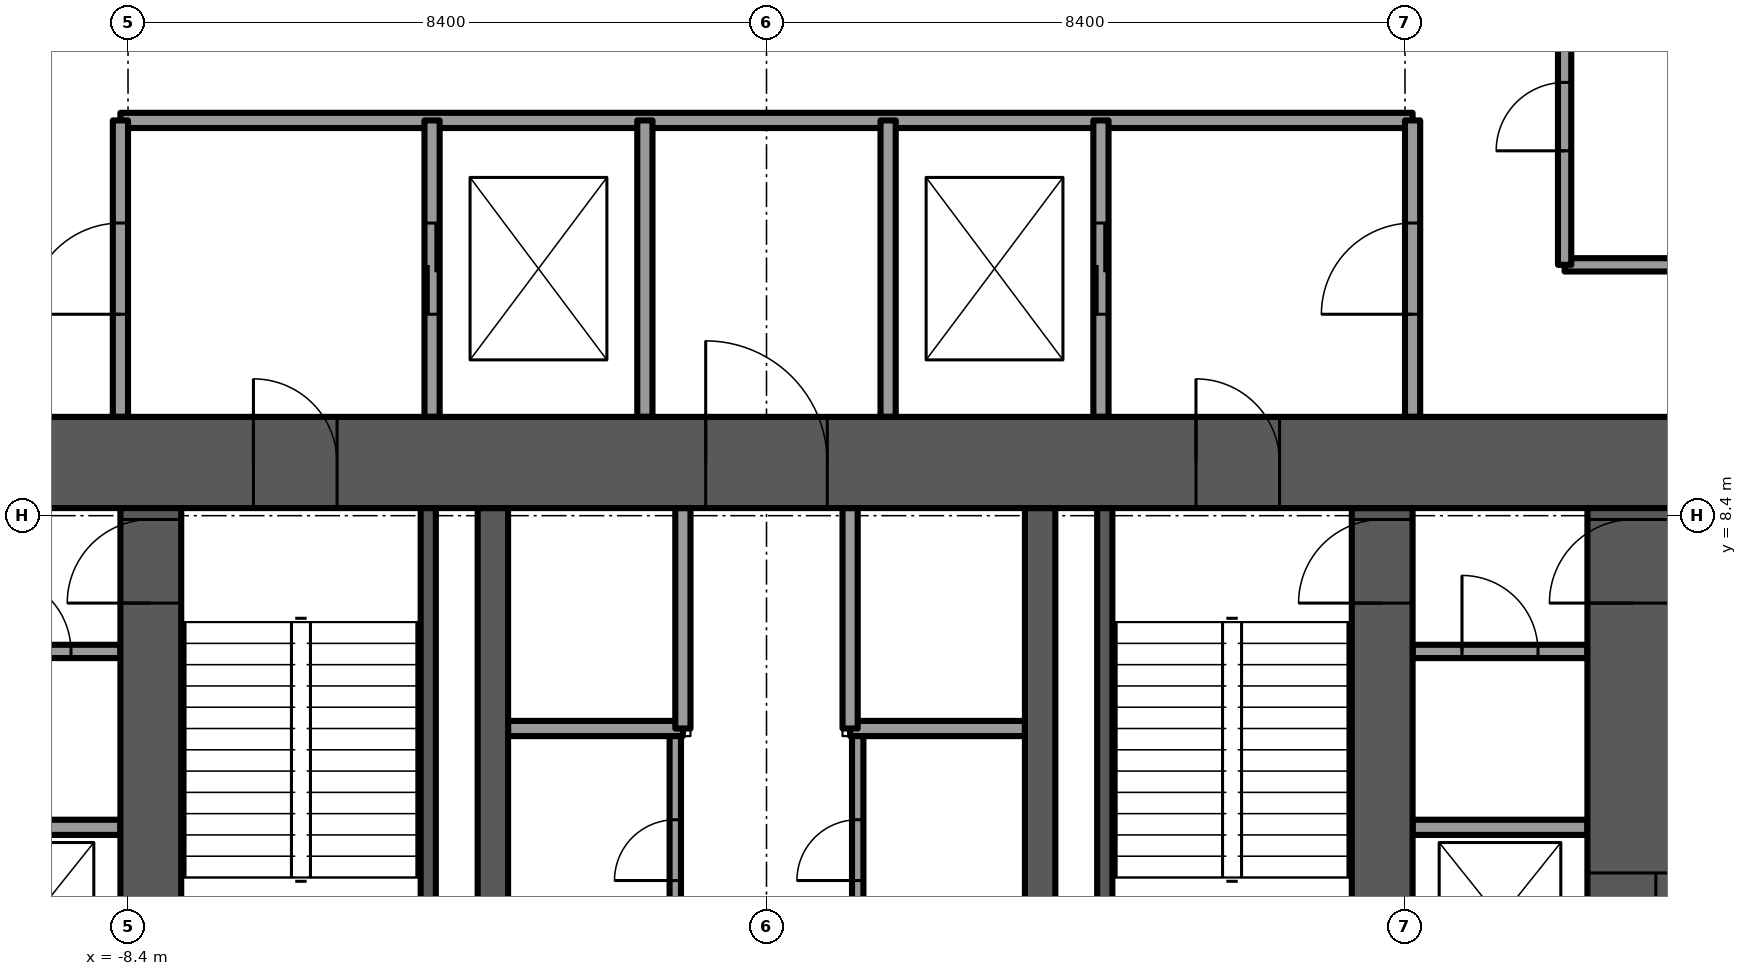
"""IFC4 building model, lengths in metres.
Left out: names, types, materials, properties, quantities, classifications, styles, units other than length and angle.
Written with IfcOpenShell. Run it as: python <this file> out.ifc"""

import sys

from ifc_helpers import new_model, si_unit, direction, frame, frame_2d, origin, place, context, subcontext, project, spatial, rectangle, extrude, element, fill, save


model = new_model("IFC4")
c1 = context("Model", 3, precision=1e-05, world=origin(), true_north=direction((0.0, 1.0)))
c2 = subcontext(c1, "Body", "Model", "MODEL_VIEW")
j1 = project(units=[si_unit("LENGTHUNIT", "METRE"), si_unit("PLANEANGLEUNIT", "RADIAN")], contexts=[c1])
p1 = place(None, origin())
s1 = spatial("IfcSite", under=j1, at=p1, CompositionType="ELEMENT")
p2 = place(p1, origin())
s2 = spatial("IfcBuilding", under=s1, at=p2, CompositionType="ELEMENT")
p3 = place(p2, frame((0.0, 0.0, 14.5)))
s3 = spatial("IfcBuildingStorey", under=s2, at=p3, CompositionType="ELEMENT", Elevation=14.5)
p4 = place(p3, frame((-12.0, 9.1, -0.3), z_axis=(0.0, 0.0, 1.0), x_axis=(1.0, 0.0, 0.0)))
e1 = element("IfcWall", 1, at=p4, inside=s3, PredefinedType="SHEAR", context=c2, shape_type="SweptSolid", body=[
    extrude(rectangle(XDim=24.0, YDim=1.2, at=frame_2d((12.0, 0.0))), origin(), (0.0, 0.0, 1.0), 4.5),
])
p5 = place(p4, frame((11.2, 0.0, 0.0)))
e2 = element("IfcOpeningElement", 2, at=p5, cuts=e1, PredefinedType="OPENING", context=c2, shape_type="SweptSolid", body=[
    extrude(rectangle(XDim=1.6, YDim=2.1, at=frame_2d((0.8, 1.05))), frame((0.0, 0.6, 0.0), z_axis=(0.0, -1.0, 0.0), x_axis=(1.0, 0.0, 0.0)), (0.0, 0.0, 1.0), 1.2),
])
p6 = place(p4, frame((5.25, 0.0, 0.0)))
e3 = element("IfcOpeningElement", 3, at=p6, cuts=e1, PredefinedType="OPENING", context=c2, shape_type="SweptSolid", body=[
    extrude(rectangle(XDim=1.1, YDim=2.1, at=frame_2d((0.55, 1.05))), frame((0.0, 0.6, 0.0), z_axis=(0.0, -1.0, 0.0), x_axis=(1.0, 0.0, 0.0)), (0.0, 0.0, 1.0), 1.2),
])
p7 = place(p4, frame((17.65, 0.0, 0.0)))
e4 = element("IfcOpeningElement", 4, at=p7, cuts=e1, PredefinedType="OPENING", context=c2, shape_type="SweptSolid", body=[
    extrude(rectangle(XDim=1.1, YDim=2.1, at=frame_2d((0.55, 1.05))), frame((0.0, 0.6, 0.0), z_axis=(0.0, -1.0, 0.0), x_axis=(1.0, 0.0, 0.0)), (0.0, 0.0, 1.0), 1.2),
])
p8 = place(p3, frame((-8.1, -0.5, -0.3), z_axis=(0.0, 0.0, 1.0), x_axis=(0.0, 1.0, 0.0)))
e5 = element("IfcWall", 5, at=p8, inside=s3, PredefinedType="SHEAR", context=c2, shape_type="SweptSolid", body=[
    extrude(rectangle(XDim=9.0, YDim=0.8, at=frame_2d((4.5, 0.0))), origin(), (0.0, 0.0, 1.0), 4.5),
])
p9 = place(p8, frame((7.75, 0.0, 0.0)))
e6 = element("IfcOpeningElement", 6, at=p9, cuts=e5, PredefinedType="OPENING", context=c2, shape_type="SweptSolid", body=[
    extrude(rectangle(XDim=1.1, YDim=2.1, at=frame_2d((0.55, 1.05))), frame((0.0, 0.4, 0.0), z_axis=(0.0, -1.0, 0.0), x_axis=(1.0, 0.0, 0.0)), (0.0, 0.0, 1.0), 0.8),
])
p10 = place(p3, frame((8.1, -0.5, -0.3), z_axis=(0.0, 0.0, 1.0), x_axis=(0.0, 1.0, 0.0)))
e7 = element("IfcWall", 7, at=p10, inside=s3, PredefinedType="SHEAR", context=c2, shape_type="SweptSolid", body=[
    extrude(rectangle(XDim=9.0, YDim=0.8, at=frame_2d((4.5, 0.0))), origin(), (0.0, 0.0, 1.0), 4.5),
])
p11 = place(p10, frame((7.75, 0.0, 0.0)))
e8 = element("IfcOpeningElement", 8, at=p11, cuts=e7, PredefinedType="OPENING", context=c2, shape_type="SweptSolid", body=[
    extrude(rectangle(XDim=1.1, YDim=2.1, at=frame_2d((0.55, 1.05))), frame((0.0, 0.4, 0.0), z_axis=(0.0, -1.0, 0.0), x_axis=(1.0, 0.0, 0.0)), (0.0, 0.0, 1.0), 0.8),
])
for number, where, z_axis, x_axis in (
    (9, (-3.6, -0.5, -0.3), (0.0, 0.0, 1.0), (0.0, 1.0, 0.0)),
    (10, (3.6, -0.5, -0.3), (0.0, 0.0, 1.0), (0.0, 1.0, 0.0)),
):
    element("IfcWall", number, at=place(p3, frame(where, z_axis=z_axis, x_axis=x_axis)), inside=s3, PredefinedType="SHEAR", context=c2, shape_type="SweptSolid", body=[
        extrude(rectangle(XDim=9.0, YDim=0.4, at=frame_2d((4.5, 0.0))), origin(), (0.0, 0.0, 1.0), 4.5),
    ])
p12 = place(p3, frame((11.4, -0.5, -0.3), z_axis=(0.0, 0.0, 1.0), x_axis=(0.0, 1.0, 0.0)))
e11 = element("IfcWall", 11, at=p12, inside=s3, PredefinedType="SHEAR", context=c2, shape_type="SweptSolid", body=[
    extrude(rectangle(XDim=9.0, YDim=1.2, at=frame_2d((4.5, 0.0))), origin(), (0.0, 0.0, 1.0), 4.5),
])
p13 = place(p12, frame((7.75, 0.0, 0.0)))
e12 = element("IfcOpeningElement", 12, at=p13, cuts=e11, PredefinedType="OPENING", context=c2, shape_type="SweptSolid", body=[
    extrude(rectangle(XDim=1.1, YDim=2.1, at=frame_2d((0.55, 1.05))), frame((0.0, 0.6, 0.0), z_axis=(0.0, -1.0, 0.0), x_axis=(1.0, 0.0, 0.0)), (0.0, 0.0, 1.0), 1.2),
])
p14 = place(p12, frame((0.55, 0.0, 0.0)))
e13 = element("IfcOpeningElement", 13, at=p14, cuts=e11, PredefinedType="OPENING", context=c2, shape_type="SweptSolid", body=[
    extrude(rectangle(XDim=1.2, YDim=2.1, at=frame_2d((0.6, 1.05))), frame((0.0, 0.6, 0.0), z_axis=(0.0, -1.0, 0.0), x_axis=(1.0, 0.0, 0.0)), (0.0, 0.0, 1.0), 1.2),
])
p15 = place(p12, frame((3.0, 0.0, 0.0)))
e14 = element("IfcOpeningElement", 14, at=p15, cuts=e11, PredefinedType="OPENING", context=c2, shape_type="SweptSolid", body=[
    extrude(rectangle(XDim=1.2, YDim=2.1, at=frame_2d((0.6, 1.05))), frame((0.0, 0.6, 0.0), z_axis=(0.0, -1.0, 0.0), x_axis=(1.0, 0.0, 0.0)), (0.0, 0.0, 1.0), 1.2),
])
for number, where, z_axis, x_axis in (
    (15, (-3.4, 5.6, 0.0), (0.0, 0.0, 1.0), (1.0, 0.0, 0.0)),
    (16, (1.1, 5.6, 0.0), (0.0, 0.0, 1.0), (1.0, 0.0, 0.0)),
):
    element("IfcWall", number, at=place(p3, frame(where, z_axis=z_axis, x_axis=x_axis)), inside=s3, PredefinedType="PARTITIONING", context=c2, shape_type="SweptSolid", body=[
        extrude(rectangle(XDim=2.3, YDim=0.2, at=frame_2d((1.15, 0.0))), origin(), (0.0, 0.0, 1.0), 4.2),
    ])
for number, where, z_axis, x_axis in (
    (17, (-1.1, 5.6, 0.0), (0.0, 0.0, 1.0), (0.0, 1.0, 0.0)),
    (18, (1.1, 5.6, 0.0), (0.0, 0.0, 1.0), (0.0, 1.0, 0.0)),
):
    element("IfcWall", number, at=place(p3, frame(where, z_axis=z_axis, x_axis=x_axis)), inside=s3, PredefinedType="PARTITIONING", context=c2, shape_type="SweptSolid", body=[
        extrude(rectangle(XDim=2.9, YDim=0.2, at=frame_2d((1.45, 0.0))), origin(), (0.0, 0.0, 1.0), 4.2),
    ])
for number, where, z_axis, x_axis in (
    (19, (-4.45, 0.9, -0.3), (0.0, 0.0, 1.0), (0.0, 1.0, 0.0)),
    (20, (4.45, 0.9, -0.3), (0.0, 0.0, 1.0), (0.0, 1.0, 0.0)),
):
    element("IfcWall", number, at=place(p3, frame(where, z_axis=z_axis, x_axis=x_axis)), inside=s3, PredefinedType="SOLIDWALL", context=c2, shape_type="SweptSolid", body=[
        extrude(rectangle(XDim=7.6, YDim=0.2, at=frame_2d((3.8, 0.0))), origin(), (0.0, 0.0, 1.0), 4.5),
    ])
p16 = place(p3, frame((-8.5, 13.6, 0.0), z_axis=(0.0, 0.0, 1.0), x_axis=(1.0, 0.0, 0.0)))
e21 = element("IfcWall", 21, at=p16, inside=s3, PredefinedType="PARTITIONING", context=c2, shape_type="SweptSolid", body=[
    extrude(rectangle(XDim=17.0, YDim=0.2, at=frame_2d((8.5, 0.0))), origin(), (0.0, 0.0, 1.0), 4.2),
])
p17 = place(p3, frame((-8.5, 9.7, 0.0), z_axis=(0.0, 0.0, 1.0), x_axis=(0.0, 1.0, 0.0)))
e22 = element("IfcWall", 22, at=p17, inside=s3, PredefinedType="PARTITIONING", context=c2, shape_type="SweptSolid", body=[
    extrude(rectangle(XDim=3.9, YDim=0.2, at=frame_2d((1.95, 0.0))), origin(), (0.0, 0.0, 1.0), 4.2),
])
p18 = place(p17, frame((1.35, 0.0, 0.0)))
e23 = element("IfcOpeningElement", 23, at=p18, cuts=e22, PredefinedType="OPENING", context=c2, shape_type="SweptSolid", body=[
    extrude(rectangle(XDim=1.2, YDim=2.1, at=frame_2d((0.6, 1.05))), frame((0.0, 0.1, 0.0), z_axis=(0.0, -1.0, 0.0), x_axis=(1.0, 0.0, 0.0)), (0.0, 0.0, 1.0), 0.2),
])
p19 = place(p3, frame((8.5, 9.7, 0.0), z_axis=(0.0, 0.0, 1.0), x_axis=(0.0, 1.0, 0.0)))
e24 = element("IfcWall", 24, at=p19, inside=s3, PredefinedType="PARTITIONING", context=c2, shape_type="SweptSolid", body=[
    extrude(rectangle(XDim=3.9, YDim=0.2, at=frame_2d((1.95, 0.0))), origin(), (0.0, 0.0, 1.0), 4.2),
])
p20 = place(p19, frame((1.35, 0.0, 0.0)))
e25 = element("IfcOpeningElement", 25, at=p20, cuts=e24, PredefinedType="OPENING", context=c2, shape_type="SweptSolid", body=[
    extrude(rectangle(XDim=1.2, YDim=2.1, at=frame_2d((0.6, 1.05))), frame((0.0, 0.1, 0.0), z_axis=(0.0, -1.0, 0.0), x_axis=(1.0, 0.0, 0.0)), (0.0, 0.0, 1.0), 0.2),
])
p21 = place(p3, frame((-4.4, 9.7, 0.0), z_axis=(0.0, 0.0, 1.0), x_axis=(0.0, 1.0, 0.0)))
e26 = element("IfcWall", 26, at=p21, inside=s3, PredefinedType="PARTITIONING", context=c2, shape_type="SweptSolid", body=[
    extrude(rectangle(XDim=3.9, YDim=0.2, at=frame_2d((1.95, 0.0))), origin(), (0.0, 0.0, 1.0), 4.2),
])
p22 = place(p21, frame((1.35, 0.0, 0.0)))
e27 = element("IfcOpeningElement", 27, at=p22, cuts=e26, PredefinedType="OPENING", context=c2, shape_type="SweptSolid", body=[
    extrude(rectangle(XDim=1.2, YDim=2.1, at=frame_2d((0.6, 1.05))), frame((0.0, 0.1, 0.0), z_axis=(0.0, -1.0, 0.0), x_axis=(1.0, 0.0, 0.0)), (0.0, 0.0, 1.0), 0.2),
])
p23 = place(p3, frame((4.4, 9.7, 0.0), z_axis=(0.0, 0.0, 1.0), x_axis=(0.0, 1.0, 0.0)))
e28 = element("IfcWall", 28, at=p23, inside=s3, PredefinedType="PARTITIONING", context=c2, shape_type="SweptSolid", body=[
    extrude(rectangle(XDim=3.9, YDim=0.2, at=frame_2d((1.95, 0.0))), origin(), (0.0, 0.0, 1.0), 4.2),
])
p24 = place(p23, frame((1.35, 0.0, 0.0)))
e29 = element("IfcOpeningElement", 29, at=p24, cuts=e28, PredefinedType="OPENING", context=c2, shape_type="SweptSolid", body=[
    extrude(rectangle(XDim=1.2, YDim=2.1, at=frame_2d((0.6, 1.05))), frame((0.0, 0.1, 0.0), z_axis=(0.0, -1.0, 0.0), x_axis=(1.0, 0.0, 0.0)), (0.0, 0.0, 1.0), 0.2),
])
for number, where, z_axis, x_axis in (
    (30, (-1.6, 9.7, 0.0), (0.0, 0.0, 1.0), (0.0, 1.0, 0.0)),
    (31, (1.6, 9.7, 0.0), (0.0, 0.0, 1.0), (0.0, 1.0, 0.0)),
):
    element("IfcWall", number, at=place(p3, frame(where, z_axis=z_axis, x_axis=x_axis)), inside=s3, PredefinedType="PARTITIONING", context=c2, shape_type="SweptSolid", body=[
        extrude(rectangle(XDim=3.9, YDim=0.2, at=frame_2d((1.95, 0.0))), origin(), (0.0, 0.0, 1.0), 4.2),
    ])
p25 = place(p3, frame((-1.2, 2.5, 0.0), z_axis=(0.0, 0.0, 1.0), x_axis=(0.0, 1.0, 0.0)))
e32 = element("IfcWall", 32, at=p25, inside=s3, PredefinedType="PARTITIONING", context=c2, shape_type="SweptSolid", body=[
    extrude(rectangle(XDim=3.0, YDim=0.15, at=frame_2d((1.5, 0.0))), origin(), (0.0, 0.0, 1.0), 4.2),
])
p26 = place(p25, frame((1.1, 0.0, 0.0)))
e33 = element("IfcOpeningElement", 33, at=p26, cuts=e32, PredefinedType="OPENING", context=c2, shape_type="SweptSolid", body=[
    extrude(rectangle(XDim=0.8, YDim=2.1, at=frame_2d((0.4, 1.05))), frame((0.0, 0.075, 0.0), z_axis=(0.0, -1.0, 0.0), x_axis=(1.0, 0.0, 0.0)), (0.0, 0.0, 1.0), 0.15),
])
p27 = place(p3, frame((1.2, 2.5, 0.0), z_axis=(0.0, 0.0, 1.0), x_axis=(0.0, 1.0, 0.0)))
e34 = element("IfcWall", 34, at=p27, inside=s3, PredefinedType="PARTITIONING", context=c2, shape_type="SweptSolid", body=[
    extrude(rectangle(XDim=3.0, YDim=0.15, at=frame_2d((1.5, 0.0))), origin(), (0.0, 0.0, 1.0), 4.2),
])
p28 = place(p27, frame((1.1, 0.0, 0.0)))
e35 = element("IfcOpeningElement", 35, at=p28, cuts=e34, PredefinedType="OPENING", context=c2, shape_type="SweptSolid", body=[
    extrude(rectangle(XDim=0.8, YDim=2.1, at=frame_2d((0.4, 1.05))), frame((0.0, 0.075, 0.0), z_axis=(0.0, -1.0, 0.0), x_axis=(1.0, 0.0, 0.0)), (0.0, 0.0, 1.0), 0.15),
])
p29 = place(p3, frame((-10.8, 4.3, 0.0), z_axis=(0.0, 0.0, 1.0), x_axis=(1.0, 0.0, 0.0)))
e36 = element("IfcWall", 36, at=p29, inside=s3, PredefinedType="PARTITIONING", context=c2, shape_type="SweptSolid", body=[
    extrude(rectangle(XDim=2.3, YDim=0.2, at=frame_2d((1.15, 0.0))), origin(), (0.0, 0.0, 1.0), 4.2),
])
p30 = place(p3, frame((-10.8, 6.614, 0.0), z_axis=(0.0, 0.0, 1.0), x_axis=(1.0, 0.0, 0.0)))
e37 = element("IfcWall", 37, at=p30, inside=s3, PredefinedType="PARTITIONING", context=c2, shape_type="SweptSolid", body=[
    extrude(rectangle(XDim=2.3, YDim=0.175, at=frame_2d((1.15, 0.0))), origin(), (0.0, 0.0, 1.0), 4.2),
])
p31 = place(p30, frame((0.65, 0.0, 0.0)))
e38 = element("IfcOpeningElement", 38, at=p31, cuts=e37, PredefinedType="OPENING", context=c2, shape_type="SweptSolid", body=[
    extrude(rectangle(XDim=1.0, YDim=2.1, at=frame_2d((0.5, 1.05))), frame((0.0, 0.087, 0.0), z_axis=(0.0, -1.0, 0.0), x_axis=(1.0, 0.0, 0.0)), (0.0, 0.0, 1.0), 0.175),
])
p32 = place(p3, frame((8.5, 4.3, 0.0), z_axis=(0.0, 0.0, 1.0), x_axis=(1.0, 0.0, 0.0)))
e39 = element("IfcWall", 39, at=p32, inside=s3, PredefinedType="PARTITIONING", context=c2, shape_type="SweptSolid", body=[
    extrude(rectangle(XDim=2.3, YDim=0.2, at=frame_2d((1.15, 0.0))), origin(), (0.0, 0.0, 1.0), 4.2),
])
p33 = place(p3, frame((8.5, 6.614, 0.0), z_axis=(0.0, 0.0, 1.0), x_axis=(1.0, 0.0, 0.0)))
e40 = element("IfcWall", 40, at=p33, inside=s3, PredefinedType="PARTITIONING", context=c2, shape_type="SweptSolid", body=[
    extrude(rectangle(XDim=2.3, YDim=0.175, at=frame_2d((1.15, 0.0))), origin(), (0.0, 0.0, 1.0), 4.2),
])
p34 = place(p33, frame((0.65, 0.0, 0.0)))
e41 = element("IfcOpeningElement", 41, at=p34, cuts=e40, PredefinedType="OPENING", context=c2, shape_type="SweptSolid", body=[
    extrude(rectangle(XDim=1.0, YDim=2.1, at=frame_2d((0.5, 1.05))), frame((0.0, 0.087, 0.0), z_axis=(0.0, -1.0, 0.0), x_axis=(1.0, 0.0, 0.0)), (0.0, 0.0, 1.0), 0.175),
])
p35 = place(p3, frame((10.5, 11.7, 0.0), z_axis=(0.0, 0.0, 1.0), x_axis=(1.0, 0.0, 0.0)))
e42 = element("IfcWall", 42, at=p35, inside=s3, PredefinedType="PARTITIONING", context=c2, shape_type="SweptSolid", body=[
    extrude(rectangle(XDim=2.938, YDim=0.175, at=frame_2d((1.469, 0.0))), origin(), (0.0, 0.0, 1.0), 4.2),
])
p36 = place(p3, frame((10.5, 11.7, 0.0), z_axis=(0.0, 0.0, 1.0), x_axis=(0.0, 1.0, 0.0)))
e43 = element("IfcWall", 43, at=p36, inside=s3, PredefinedType="PARTITIONING", context=c2, shape_type="SweptSolid", body=[
    extrude(rectangle(XDim=3.9, YDim=0.175, at=frame_2d((1.95, 0.0))), origin(), (0.0, 0.0, 1.0), 4.2),
])
p37 = place(p36, frame((1.5, 0.0, 0.0)))
e44 = element("IfcOpeningElement", 44, at=p37, cuts=e43, PredefinedType="OPENING", context=c2, shape_type="SweptSolid", body=[
    extrude(rectangle(XDim=0.9, YDim=2.1, at=frame_2d((0.45, 1.05))), frame((0.0, 0.087, 0.0), z_axis=(0.0, -1.0, 0.0), x_axis=(1.0, 0.0, 0.0)), (0.0, 0.0, 1.0), 0.175),
])
p38 = place(p5, origin())
e45 = element("IfcDoor", 45, at=p38, inside=s3, OperationType="DOUBLE_DOOR_SINGLE_SWING", PredefinedType="DOOR", context=c2, shape_type="SweptSolid", body=[
    extrude(rectangle(XDim=1.6, YDim=2.1, at=frame_2d((0.8, 1.05))), frame((0.0, 0.025, 0.0), z_axis=(0.0, -1.0, 0.0), x_axis=(1.0, 0.0, 0.0)), (0.0, 0.0, 1.0), 0.05),
])
fill(e2, e45)
p39 = place(p6, origin())
e46 = element("IfcDoor", 46, at=p39, inside=s3, OperationType="SINGLE_SWING_LEFT", PredefinedType="DOOR", context=c2, shape_type="SweptSolid", body=[
    extrude(rectangle(XDim=1.1, YDim=2.1, at=frame_2d((0.55, 1.05))), frame((0.0, 0.025, 0.0), z_axis=(0.0, -1.0, 0.0), x_axis=(1.0, 0.0, 0.0)), (0.0, 0.0, 1.0), 0.05),
])
fill(e3, e46)
p40 = place(p9, origin())
e47 = element("IfcDoor", 47, at=p40, inside=s3, OperationType="SINGLE_SWING_RIGHT", PredefinedType="DOOR", context=c2, shape_type="SweptSolid", body=[
    extrude(rectangle(XDim=1.1, YDim=2.1, at=frame_2d((0.55, 1.05))), frame((0.0, 0.025, 0.0), z_axis=(0.0, -1.0, 0.0), x_axis=(1.0, 0.0, 0.0)), (0.0, 0.0, 1.0), 0.05),
])
fill(e6, e47)
p41 = place(p7, origin())
e48 = element("IfcDoor", 48, at=p41, inside=s3, OperationType="SINGLE_SWING_RIGHT", PredefinedType="DOOR", context=c2, shape_type="SweptSolid", body=[
    extrude(rectangle(XDim=1.1, YDim=2.1, at=frame_2d((0.55, 1.05))), frame((0.0, 0.025, 0.0), z_axis=(0.0, -1.0, 0.0), x_axis=(1.0, 0.0, 0.0)), (0.0, 0.0, 1.0), 0.05),
])
fill(e4, e48)
p42 = place(p11, origin())
e49 = element("IfcDoor", 49, at=p42, inside=s3, OperationType="SINGLE_SWING_LEFT", PredefinedType="DOOR", context=c2, shape_type="SweptSolid", body=[
    extrude(rectangle(XDim=1.1, YDim=2.1, at=frame_2d((0.55, 1.05))), frame((0.0, 0.025, 0.0), z_axis=(0.0, -1.0, 0.0), x_axis=(1.0, 0.0, 0.0)), (0.0, 0.0, 1.0), 0.05),
])
fill(e8, e49)
p43 = place(p22, origin())
e50 = element("IfcDoor", 50, at=p43, inside=s3, OperationType="SLIDING_TO_LEFT", PredefinedType="DOOR", context=c2, shape_type="SweptSolid", body=[
    extrude(rectangle(XDim=1.2, YDim=2.1, at=frame_2d((0.6, 1.05))), frame((0.0, 0.025, 0.0), z_axis=(0.0, -1.0, 0.0), x_axis=(1.0, 0.0, 0.0)), (0.0, 0.0, 1.0), 0.05),
])
fill(e27, e50)
p44 = place(p18, origin())
e51 = element("IfcDoor", 51, at=p44, inside=s3, OperationType="SINGLE_SWING_LEFT", PredefinedType="DOOR", context=c2, shape_type="SweptSolid", body=[
    extrude(rectangle(XDim=1.2, YDim=2.1, at=frame_2d((0.6, 1.05))), frame((0.0, 0.025, 0.0), z_axis=(0.0, -1.0, 0.0), x_axis=(1.0, 0.0, 0.0)), (0.0, 0.0, 1.0), 0.05),
])
fill(e23, e51)
p45 = place(p24, origin())
e52 = element("IfcDoor", 52, at=p45, inside=s3, OperationType="SLIDING_TO_LEFT", PredefinedType="DOOR", context=c2, shape_type="SweptSolid", body=[
    extrude(rectangle(XDim=1.2, YDim=2.1, at=frame_2d((0.6, 1.05))), frame((0.0, 0.025, 0.0), z_axis=(0.0, -1.0, 0.0), x_axis=(1.0, 0.0, 0.0)), (0.0, 0.0, 1.0), 0.05),
])
fill(e29, e52)
p46 = place(p20, origin())
e53 = element("IfcDoor", 53, at=p46, inside=s3, OperationType="SINGLE_SWING_LEFT", PredefinedType="DOOR", context=c2, shape_type="SweptSolid", body=[
    extrude(rectangle(XDim=1.2, YDim=2.1, at=frame_2d((0.6, 1.05))), frame((0.0, 0.025, 0.0), z_axis=(0.0, -1.0, 0.0), x_axis=(1.0, 0.0, 0.0)), (0.0, 0.0, 1.0), 0.05),
])
fill(e25, e53)
p47 = place(p26, origin())
e54 = element("IfcDoor", 54, at=p47, inside=s3, OperationType="SINGLE_SWING_LEFT", PredefinedType="DOOR", context=c2, shape_type="SweptSolid", body=[
    extrude(rectangle(XDim=0.8, YDim=2.1, at=frame_2d((0.4, 1.05))), frame((0.0, 0.025, 0.0), z_axis=(0.0, -1.0, 0.0), x_axis=(1.0, 0.0, 0.0)), (0.0, 0.0, 1.0), 0.05),
])
fill(e33, e54)
p48 = place(p28, origin())
e55 = element("IfcDoor", 55, at=p48, inside=s3, OperationType="SINGLE_SWING_RIGHT", PredefinedType="DOOR", context=c2, shape_type="SweptSolid", body=[
    extrude(rectangle(XDim=0.8, YDim=2.1, at=frame_2d((0.4, 1.05))), frame((0.0, 0.025, 0.0), z_axis=(0.0, -1.0, 0.0), x_axis=(1.0, 0.0, 0.0)), (0.0, 0.0, 1.0), 0.05),
])
fill(e35, e55)
p49 = place(p31, origin())
e56 = element("IfcDoor", 56, at=p49, inside=s3, OperationType="SINGLE_SWING_LEFT", PredefinedType="DOOR", context=c2, shape_type="SweptSolid", body=[
    extrude(rectangle(XDim=1.0, YDim=2.1, at=frame_2d((0.5, 1.05))), frame((0.0, 0.025, 0.0), z_axis=(0.0, -1.0, 0.0), x_axis=(1.0, 0.0, 0.0)), (0.0, 0.0, 1.0), 0.05),
])
fill(e38, e56)
p50 = place(p34, origin())
e57 = element("IfcDoor", 57, at=p50, inside=s3, OperationType="SINGLE_SWING_RIGHT", PredefinedType="DOOR", context=c2, shape_type="SweptSolid", body=[
    extrude(rectangle(XDim=1.0, YDim=2.1, at=frame_2d((0.5, 1.05))), frame((0.0, 0.025, 0.0), z_axis=(0.0, -1.0, 0.0), x_axis=(1.0, 0.0, 0.0)), (0.0, 0.0, 1.0), 0.05),
])
fill(e41, e57)
p51 = place(p13, origin())
e58 = element("IfcDoor", 58, at=p51, inside=s3, OperationType="SINGLE_SWING_RIGHT", PredefinedType="DOOR", context=c2, shape_type="SweptSolid", body=[
    extrude(rectangle(XDim=1.1, YDim=2.1, at=frame_2d((0.55, 1.05))), frame((0.0, 0.025, 0.0), z_axis=(0.0, -1.0, 0.0), x_axis=(1.0, 0.0, 0.0)), (0.0, 0.0, 1.0), 0.05),
])
fill(e12, e58)
p52 = place(p15, origin())
e59 = element("IfcDoor", 59, at=p52, inside=s3, OperationType="SLIDING_TO_LEFT", PredefinedType="DOOR", context=c2, shape_type="SweptSolid", body=[
    extrude(rectangle(XDim=1.2, YDim=2.1, at=frame_2d((0.6, 1.05))), frame((0.0, 0.025, 0.0), z_axis=(0.0, -1.0, 0.0), x_axis=(1.0, 0.0, 0.0)), (0.0, 0.0, 1.0), 0.05),
])
fill(e14, e59)
p53 = place(p37, origin())
e60 = element("IfcDoor", 60, at=p53, inside=s3, OperationType="SINGLE_SWING_RIGHT", PredefinedType="DOOR", context=c2, shape_type="SweptSolid", body=[
    extrude(rectangle(XDim=0.9, YDim=2.1, at=frame_2d((0.45, 1.05))), frame((0.0, 0.025, 0.0), z_axis=(0.0, -1.0, 0.0), x_axis=(1.0, 0.0, 0.0)), (0.0, 0.0, 1.0), 0.05),
])
fill(e44, e60)
save(model, sys.argv[1])
